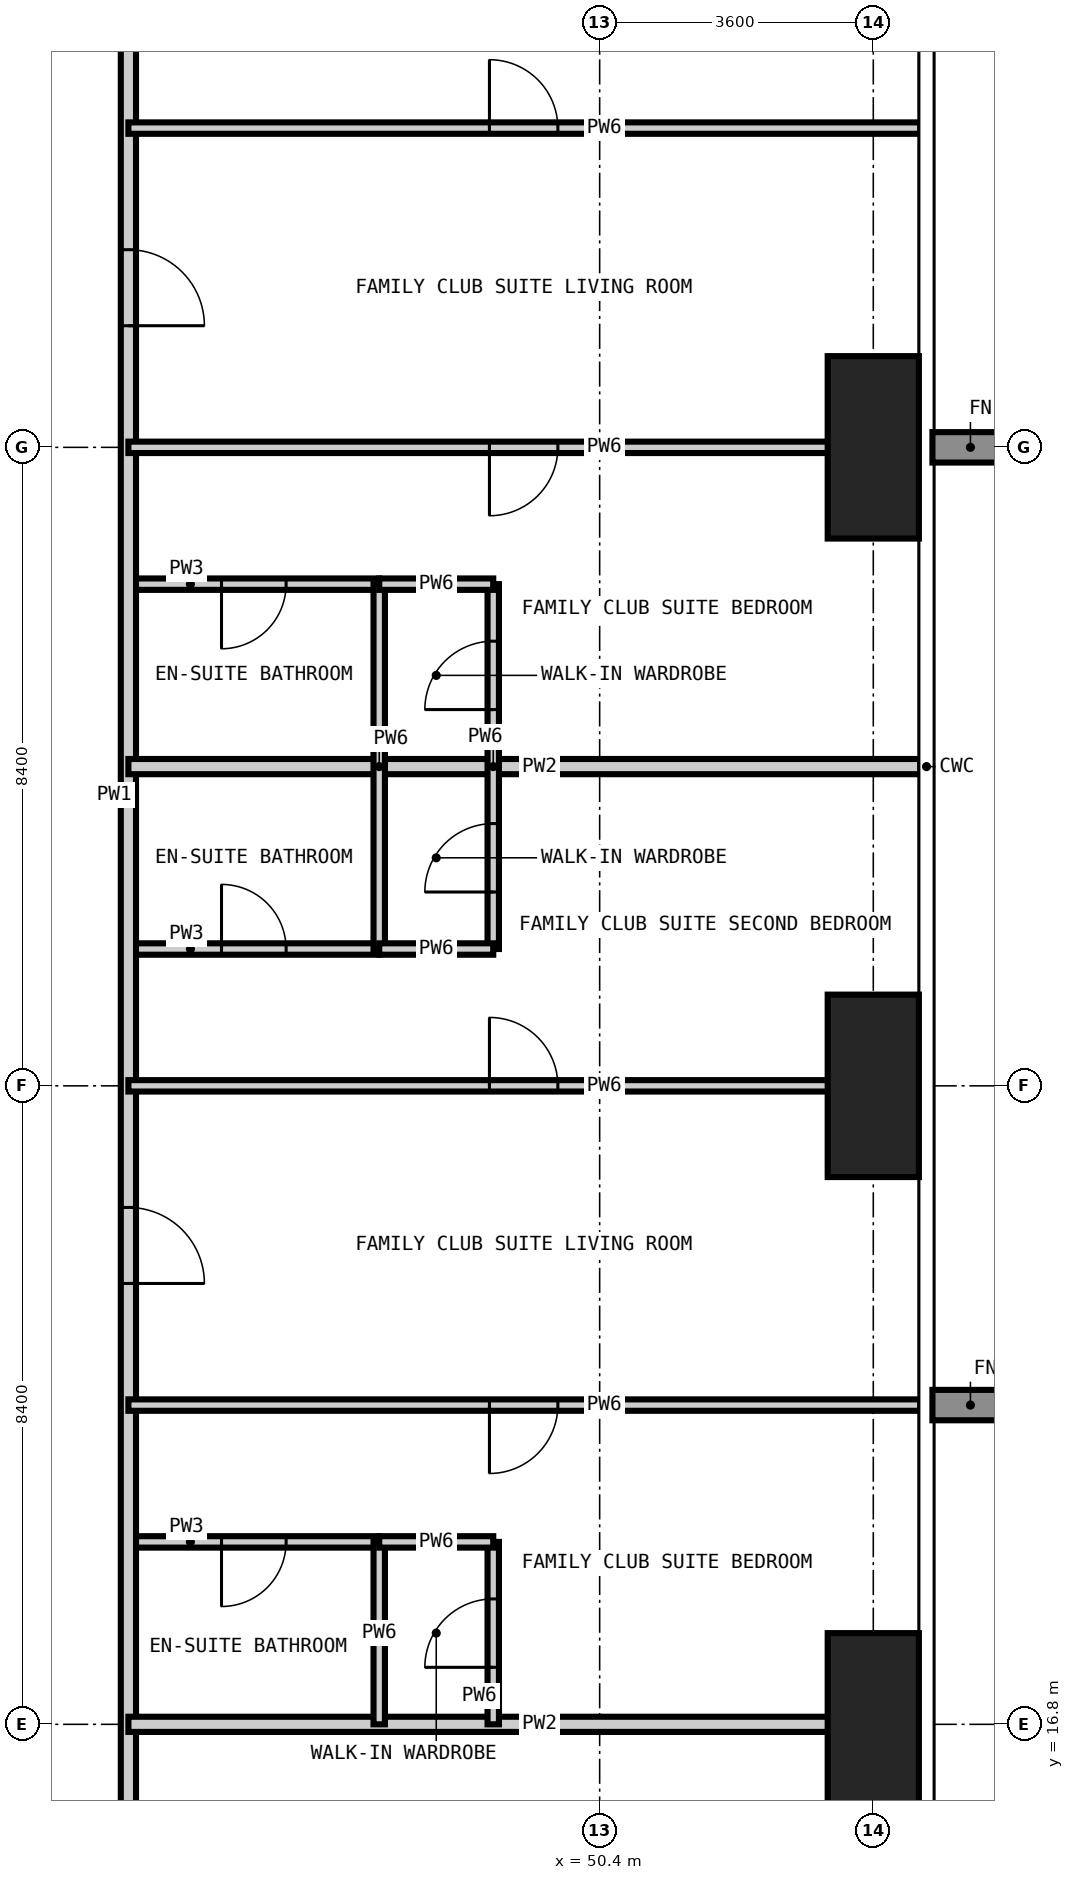
"""IFC4 building model, lengths in metres.
Left out: names, types, materials, properties, quantities, classifications, styles, units other than length and angle.
Written with IfcOpenShell. Run it as: python <this file> out.ifc"""

import sys

from ifc_helpers import new_model, si_unit, direction, frame, frame_2d, origin, origin_2d, place, context, subcontext, project, spatial, rectangle, extrude, element, fill, save


model = new_model("IFC4")
c1 = context("Model", 3, precision=1e-05, world=origin(), true_north=direction((0.0, 1.0)))
c2 = subcontext(c1, "Body", "Model", "MODEL_VIEW")
j1 = project(units=[si_unit("LENGTHUNIT", "METRE"), si_unit("PLANEANGLEUNIT", "RADIAN")], contexts=[c1])
p1 = place(None, origin())
s1 = spatial("IfcSite", under=j1, at=p1, CompositionType="ELEMENT")
p2 = place(p1, origin())
s2 = spatial("IfcBuilding", under=s1, at=p2, CompositionType="ELEMENT")
p3 = place(p2, frame((0.0, 0.0, 198.6)))
s3 = spatial("IfcBuildingStorey", under=s2, at=p3, CompositionType="ELEMENT", Elevation=198.6)
for number, where, z_axis, x_axis in (
    (1, (54.0, 16.8, -0.35), (0.0, 0.0, 1.0), (1.0, 0.0, 0.0)),
    (2, (54.0, 25.2, -0.35), (0.0, 0.0, 1.0), (1.0, 0.0, 0.0)),
    (3, (54.0, 33.6, -0.35), (0.0, 0.0, 1.0), (1.0, 0.0, 0.0)),
):
    element("IfcColumn", number, at=place(p3, frame(where, z_axis=z_axis, x_axis=x_axis)), inside=s3, PredefinedType="COLUMN", context=c2, shape_type="SweptSolid", body=[
        extrude(rectangle(XDim=1.2, YDim=2.4, at=origin_2d()), origin(), (0.0, 0.0, 1.0), 3.6),
    ])
p4 = place(p3, frame((44.2, 19.2, 0.0), z_axis=(0.0, 0.0, 1.0), x_axis=(1.0, 0.0, 0.0)))
e4 = element("IfcWall", 4, at=p4, inside=s3, PredefinedType="PARTITIONING", context=c2, shape_type="SweptSolid", body=[
    extrude(rectangle(XDim=3.3, YDim=0.15, at=frame_2d((1.65, 0.0))), origin(), (0.0, 0.0, 1.0), 3.25),
])
p5 = place(p4, frame((1.225, 0.0, 0.0)))
e5 = element("IfcOpeningElement", 5, at=p5, cuts=e4, PredefinedType="OPENING", context=c2, shape_type="SweptSolid", body=[
    extrude(rectangle(XDim=0.85, YDim=2.1, at=frame_2d((0.425, 1.05))), frame((0.0, 0.085, 0.0), z_axis=(0.0, -1.0, 0.0), x_axis=(1.0, 0.0, 0.0)), (0.0, 0.0, 1.0), 0.17),
])
p6 = place(p3, frame((44.2, 27.0, 0.0), z_axis=(0.0, 0.0, 1.0), x_axis=(1.0, 0.0, 0.0)))
e6 = element("IfcWall", 6, at=p6, inside=s3, PredefinedType="PARTITIONING", context=c2, shape_type="SweptSolid", body=[
    extrude(rectangle(XDim=3.3, YDim=0.15, at=frame_2d((1.65, 0.0))), origin(), (0.0, 0.0, 1.0), 3.25),
])
p7 = place(p6, frame((1.225, 0.0, 0.0)))
e7 = element("IfcOpeningElement", 7, at=p7, cuts=e6, PredefinedType="OPENING", context=c2, shape_type="SweptSolid", body=[
    extrude(rectangle(XDim=0.85, YDim=2.1, at=frame_2d((0.425, 1.05))), frame((0.0, 0.085, 0.0), z_axis=(0.0, -1.0, 0.0), x_axis=(1.0, 0.0, 0.0)), (0.0, 0.0, 1.0), 0.17),
])
p8 = place(p3, frame((44.2, 31.8, 0.0), z_axis=(0.0, 0.0, 1.0), x_axis=(1.0, 0.0, 0.0)))
e8 = element("IfcWall", 8, at=p8, inside=s3, PredefinedType="PARTITIONING", context=c2, shape_type="SweptSolid", body=[
    extrude(rectangle(XDim=3.3, YDim=0.15, at=frame_2d((1.65, 0.0))), origin(), (0.0, 0.0, 1.0), 3.25),
])
p9 = place(p8, frame((1.225, 0.0, 0.0)))
e9 = element("IfcOpeningElement", 9, at=p9, cuts=e8, PredefinedType="OPENING", context=c2, shape_type="SweptSolid", body=[
    extrude(rectangle(XDim=0.85, YDim=2.1, at=frame_2d((0.425, 1.05))), frame((0.0, 0.085, 0.0), z_axis=(0.0, -1.0, 0.0), x_axis=(1.0, 0.0, 0.0)), (0.0, 0.0, 1.0), 0.17),
])
p10 = place(p3, frame((44.2, 44.8, 0.0), z_axis=(0.0, 0.0, 1.0), x_axis=(0.0, -1.0, 0.0)))
e10 = element("IfcWall", 10, at=p10, inside=s3, PredefinedType="PARTITIONING", context=c2, shape_type="SweptSolid", body=[
    extrude(rectangle(XDim=31.4, YDim=0.2, at=frame_2d((15.7, 0.0))), origin(), (0.0, 0.0, 1.0), 3.25),
])
p11 = place(p10, frame((21.2, 0.0, 0.0)))
e11 = element("IfcOpeningElement", 11, at=p11, cuts=e10, PredefinedType="OPENING", context=c2, shape_type="SweptSolid", body=[
    extrude(rectangle(XDim=1.0, YDim=2.2, at=frame_2d((0.5, 1.1))), frame((0.0, 0.11, 0.0), z_axis=(0.0, -1.0, 0.0), x_axis=(1.0, 0.0, 0.0)), (0.0, 0.0, 1.0), 0.22),
])
p12 = place(p10, frame((8.6, 0.0, 0.0)))
e12 = element("IfcOpeningElement", 12, at=p12, cuts=e10, PredefinedType="OPENING", context=c2, shape_type="SweptSolid", body=[
    extrude(rectangle(XDim=1.0, YDim=2.2, at=frame_2d((0.5, 1.1))), frame((0.0, 0.11, 0.0), z_axis=(0.0, -1.0, 0.0), x_axis=(1.0, 0.0, 0.0)), (0.0, 0.0, 1.0), 0.22),
])
p13 = place(p10, frame((29.2, 0.0, 0.0)))
e13 = element("IfcOpeningElement", 13, at=p13, cuts=e10, PredefinedType="OPENING", context=c2, shape_type="SweptSolid", body=[
    extrude(rectangle(XDim=1.0, YDim=2.2, at=frame_2d((0.5, 1.1))), frame((0.0, 0.11, 0.0), z_axis=(0.0, -1.0, 0.0), x_axis=(1.0, 0.0, 0.0)), (0.0, 0.0, 1.0), 0.22),
])
p14 = place(p10, frame((0.9, 0.0, 0.0)))
e14 = element("IfcOpeningElement", 14, at=p14, cuts=e10, PredefinedType="OPENING", context=c2, shape_type="SweptSolid", body=[
    extrude(rectangle(XDim=1.0, YDim=2.2, at=frame_2d((0.5, 1.1))), frame((0.0, 0.11, 0.0), z_axis=(0.0, -1.0, 0.0), x_axis=(1.0, 0.0, 0.0)), (0.0, 0.0, 1.0), 0.22),
])
for number, where, z_axis, x_axis in (
    (15, (44.2, 16.8, 0.0), (0.0, 0.0, 1.0), (1.0, 0.0, 0.0)),
    (16, (44.2, 29.4, 0.0), (0.0, 0.0, 1.0), (1.0, 0.0, 0.0)),
):
    element("IfcWall", number, at=place(p3, frame(where, z_axis=z_axis, x_axis=x_axis)), inside=s3, PredefinedType="PARTITIONING", context=c2, shape_type="SweptSolid", body=[
        extrude(rectangle(XDim=10.418, YDim=0.2, at=frame_2d((5.209, 0.0))), origin(), (0.0, 0.0, 1.0), 3.25),
    ])
p15 = place(p3, frame((47.5, 16.8, 0.0), z_axis=(0.0, 0.0, 1.0), x_axis=(0.0, 1.0, 0.0)))
e17 = element("IfcWall", 17, at=p15, inside=s3, PredefinedType="PARTITIONING", context=c2, shape_type="SweptSolid", body=[
    extrude(rectangle(XDim=2.4, YDim=0.15, at=frame_2d((1.2, 0.0))), origin(), (0.0, 0.0, 1.0), 3.25),
])
p16 = place(p3, frame((47.5, 27.0, 0.0), z_axis=(0.0, 0.0, 1.0), x_axis=(0.0, 1.0, 0.0)))
e18 = element("IfcWall", 18, at=p16, inside=s3, PredefinedType="PARTITIONING", context=c2, shape_type="SweptSolid", body=[
    extrude(rectangle(XDim=4.8, YDim=0.15, at=frame_2d((2.4, 0.0))), origin(), (0.0, 0.0, 1.0), 3.25),
])
p17 = place(p3, frame((49.0, 16.8, 0.0), z_axis=(0.0, 0.0, 1.0), x_axis=(0.0, 1.0, 0.0)))
e19 = element("IfcWall", 19, at=p17, inside=s3, PredefinedType="PARTITIONING", context=c2, shape_type="SweptSolid", body=[
    extrude(rectangle(XDim=2.4, YDim=0.15, at=frame_2d((1.2, 0.0))), origin(), (0.0, 0.0, 1.0), 3.25),
])
p18 = place(p17, frame((0.75, 0.0, 0.0)))
e20 = element("IfcOpeningElement", 20, at=p18, cuts=e19, PredefinedType="OPENING", context=c2, shape_type="SweptSolid", body=[
    extrude(rectangle(XDim=0.9, YDim=2.1, at=frame_2d((0.45, 1.05))), frame((0.0, 0.085, 0.0), z_axis=(0.0, -1.0, 0.0), x_axis=(1.0, 0.0, 0.0)), (0.0, 0.0, 1.0), 0.17),
])
p19 = place(p3, frame((49.0, 27.0, 0.0), z_axis=(0.0, 0.0, 1.0), x_axis=(0.0, 1.0, 0.0)))
e21 = element("IfcWall", 21, at=p19, inside=s3, PredefinedType="PARTITIONING", context=c2, shape_type="SweptSolid", body=[
    extrude(rectangle(XDim=4.8, YDim=0.15, at=frame_2d((2.4, 0.0))), origin(), (0.0, 0.0, 1.0), 3.25),
])
p20 = place(p19, frame((0.75, 0.0, 0.0)))
e22 = element("IfcOpeningElement", 22, at=p20, cuts=e21, PredefinedType="OPENING", context=c2, shape_type="SweptSolid", body=[
    extrude(rectangle(XDim=0.9, YDim=2.1, at=frame_2d((0.45, 1.05))), frame((0.0, 0.085, 0.0), z_axis=(0.0, -1.0, 0.0), x_axis=(1.0, 0.0, 0.0)), (0.0, 0.0, 1.0), 0.17),
])
p21 = place(p19, frame((3.15, 0.0, 0.0)))
e23 = element("IfcOpeningElement", 23, at=p21, cuts=e21, PredefinedType="OPENING", context=c2, shape_type="SweptSolid", body=[
    extrude(rectangle(XDim=0.9, YDim=2.1, at=frame_2d((0.45, 1.05))), frame((0.0, 0.085, 0.0), z_axis=(0.0, -1.0, 0.0), x_axis=(1.0, 0.0, 0.0)), (0.0, 0.0, 1.0), 0.17),
])
p22 = place(p3, frame((47.5, 19.2, 0.0), z_axis=(0.0, 0.0, 1.0), x_axis=(1.0, 0.0, 0.0)))
e24 = element("IfcWall", 24, at=p22, inside=s3, PredefinedType="PARTITIONING", context=c2, shape_type="SweptSolid", body=[
    extrude(rectangle(XDim=1.5, YDim=0.15, at=frame_2d((0.75, 0.0))), origin(), (0.0, 0.0, 1.0), 3.25),
])
p23 = place(p3, frame((44.2, 21.0, 0.0), z_axis=(0.0, 0.0, 1.0), x_axis=(1.0, 0.0, 0.0)))
e25 = element("IfcWall", 25, at=p23, inside=s3, PredefinedType="PARTITIONING", context=c2, shape_type="SweptSolid", body=[
    extrude(rectangle(XDim=10.418, YDim=0.15, at=frame_2d((5.209, 0.0))), origin(), (0.0, 0.0, 1.0), 3.25),
])
p24 = place(p23, frame((4.75, 0.0, 0.0)))
e26 = element("IfcOpeningElement", 26, at=p24, cuts=e25, PredefinedType="OPENING", context=c2, shape_type="SweptSolid", body=[
    extrude(rectangle(XDim=0.9, YDim=2.1, at=frame_2d((0.45, 1.05))), frame((0.0, 0.085, 0.0), z_axis=(0.0, -1.0, 0.0), x_axis=(1.0, 0.0, 0.0)), (0.0, 0.0, 1.0), 0.17),
])
p25 = place(p3, frame((44.2, 25.2, 0.0), z_axis=(0.0, 0.0, 1.0), x_axis=(1.0, 0.0, 0.0)))
e27 = element("IfcWall", 27, at=p25, inside=s3, PredefinedType="PARTITIONING", context=c2, shape_type="SweptSolid", body=[
    extrude(rectangle(XDim=10.418, YDim=0.15, at=frame_2d((5.209, 0.0))), origin(), (0.0, 0.0, 1.0), 3.25),
])
p26 = place(p25, frame((4.75, 0.0, 0.0)))
e28 = element("IfcOpeningElement", 28, at=p26, cuts=e27, PredefinedType="OPENING", context=c2, shape_type="SweptSolid", body=[
    extrude(rectangle(XDim=0.9, YDim=2.1, at=frame_2d((0.45, 1.05))), frame((0.0, 0.085, 0.0), z_axis=(0.0, -1.0, 0.0), x_axis=(1.0, 0.0, 0.0)), (0.0, 0.0, 1.0), 0.17),
])
for number, where, z_axis, x_axis in (
    (29, (47.5, 27.0, 0.0), (0.0, 0.0, 1.0), (1.0, 0.0, 0.0)),
    (30, (47.5, 31.8, 0.0), (0.0, 0.0, 1.0), (1.0, 0.0, 0.0)),
):
    element("IfcWall", number, at=place(p3, frame(where, z_axis=z_axis, x_axis=x_axis)), inside=s3, PredefinedType="PARTITIONING", context=c2, shape_type="SweptSolid", body=[
        extrude(rectangle(XDim=1.5, YDim=0.15, at=frame_2d((0.75, 0.0))), origin(), (0.0, 0.0, 1.0), 3.25),
    ])
p27 = place(p3, frame((44.2, 33.6, 0.0), z_axis=(0.0, 0.0, 1.0), x_axis=(1.0, 0.0, 0.0)))
e31 = element("IfcWall", 31, at=p27, inside=s3, PredefinedType="PARTITIONING", context=c2, shape_type="SweptSolid", body=[
    extrude(rectangle(XDim=10.418, YDim=0.15, at=frame_2d((5.209, 0.0))), origin(), (0.0, 0.0, 1.0), 3.25),
])
p28 = place(p27, frame((4.75, 0.0, 0.0)))
e32 = element("IfcOpeningElement", 32, at=p28, cuts=e31, PredefinedType="OPENING", context=c2, shape_type="SweptSolid", body=[
    extrude(rectangle(XDim=0.9, YDim=2.1, at=frame_2d((0.45, 1.05))), frame((0.0, 0.085, 0.0), z_axis=(0.0, -1.0, 0.0), x_axis=(1.0, 0.0, 0.0)), (0.0, 0.0, 1.0), 0.17),
])
p29 = place(p3, frame((44.2, 37.8, 0.0), z_axis=(0.0, 0.0, 1.0), x_axis=(1.0, 0.0, 0.0)))
e33 = element("IfcWall", 33, at=p29, inside=s3, PredefinedType="PARTITIONING", context=c2, shape_type="SweptSolid", body=[
    extrude(rectangle(XDim=10.418, YDim=0.15, at=frame_2d((5.209, 0.0))), origin(), (0.0, 0.0, 1.0), 3.25),
])
p30 = place(p29, frame((4.75, 0.0, 0.0)))
e34 = element("IfcOpeningElement", 34, at=p30, cuts=e33, PredefinedType="OPENING", context=c2, shape_type="SweptSolid", body=[
    extrude(rectangle(XDim=0.9, YDim=2.1, at=frame_2d((0.45, 1.05))), frame((0.0, 0.085, 0.0), z_axis=(0.0, -1.0, 0.0), x_axis=(1.0, 0.0, 0.0)), (0.0, 0.0, 1.0), 0.17),
])
p31 = place(p11, origin())
e35 = element("IfcDoor", 35, at=p31, inside=s3, OperationType="SINGLE_SWING_RIGHT", PredefinedType="DOOR", context=c2, shape_type="SweptSolid", body=[
    extrude(rectangle(XDim=1.0, YDim=2.2, at=frame_2d((0.5, 1.1))), frame((0.0, 0.025, 0.0), z_axis=(0.0, -1.0, 0.0), x_axis=(1.0, 0.0, 0.0)), (0.0, 0.0, 1.0), 0.05),
])
fill(e11, e35)
p32 = place(p24, frame((0.9, 0.0, 0.0), z_axis=(0.0, 0.0, 1.0), x_axis=(-1.0, 0.0, 0.0)))
e36 = element("IfcDoor", 36, at=p32, inside=s3, OperationType="SINGLE_SWING_RIGHT", PredefinedType="DOOR", context=c2, shape_type="SweptSolid", body=[
    extrude(rectangle(XDim=0.9, YDim=2.1, at=frame_2d((0.45, 1.05))), frame((0.0, 0.025, 0.0), z_axis=(0.0, -1.0, 0.0), x_axis=(1.0, 0.0, 0.0)), (0.0, 0.0, 1.0), 0.05),
])
fill(e26, e36)
p33 = place(p5, frame((0.85, 0.0, 0.0), z_axis=(0.0, 0.0, 1.0), x_axis=(-1.0, 0.0, 0.0)))
e37 = element("IfcDoor", 37, at=p33, inside=s3, OperationType="SINGLE_SWING_RIGHT", PredefinedType="DOOR", context=c2, shape_type="SweptSolid", body=[
    extrude(rectangle(XDim=0.85, YDim=2.1, at=frame_2d((0.425, 1.05))), frame((0.0, 0.025, 0.0), z_axis=(0.0, -1.0, 0.0), x_axis=(1.0, 0.0, 0.0)), (0.0, 0.0, 1.0), 0.05),
])
fill(e5, e37)
p34 = place(p18, origin())
e38 = element("IfcDoor", 38, at=p34, inside=s3, OperationType="SINGLE_SWING_LEFT", PredefinedType="DOOR", context=c2, shape_type="SweptSolid", body=[
    extrude(rectangle(XDim=0.9, YDim=2.1, at=frame_2d((0.45, 1.05))), frame((0.0, 0.025, 0.0), z_axis=(0.0, -1.0, 0.0), x_axis=(1.0, 0.0, 0.0)), (0.0, 0.0, 1.0), 0.05),
])
fill(e20, e38)
p35 = place(p26, origin())
e39 = element("IfcDoor", 39, at=p35, inside=s3, OperationType="SINGLE_SWING_LEFT", PredefinedType="DOOR", context=c2, shape_type="SweptSolid", body=[
    extrude(rectangle(XDim=0.9, YDim=2.1, at=frame_2d((0.45, 1.05))), frame((0.0, 0.025, 0.0), z_axis=(0.0, -1.0, 0.0), x_axis=(1.0, 0.0, 0.0)), (0.0, 0.0, 1.0), 0.05),
])
fill(e28, e39)
p36 = place(p7, origin())
e40 = element("IfcDoor", 40, at=p36, inside=s3, OperationType="SINGLE_SWING_LEFT", PredefinedType="DOOR", context=c2, shape_type="SweptSolid", body=[
    extrude(rectangle(XDim=0.85, YDim=2.1, at=frame_2d((0.425, 1.05))), frame((0.0, 0.025, 0.0), z_axis=(0.0, -1.0, 0.0), x_axis=(1.0, 0.0, 0.0)), (0.0, 0.0, 1.0), 0.05),
])
fill(e7, e40)
p37 = place(p20, origin())
e41 = element("IfcDoor", 41, at=p37, inside=s3, OperationType="SINGLE_SWING_LEFT", PredefinedType="DOOR", context=c2, shape_type="SweptSolid", body=[
    extrude(rectangle(XDim=0.9, YDim=2.1, at=frame_2d((0.45, 1.05))), frame((0.0, 0.025, 0.0), z_axis=(0.0, -1.0, 0.0), x_axis=(1.0, 0.0, 0.0)), (0.0, 0.0, 1.0), 0.05),
])
fill(e22, e41)
p38 = place(p12, origin())
e42 = element("IfcDoor", 42, at=p38, inside=s3, OperationType="SINGLE_SWING_RIGHT", PredefinedType="DOOR", context=c2, shape_type="SweptSolid", body=[
    extrude(rectangle(XDim=1.0, YDim=2.2, at=frame_2d((0.5, 1.1))), frame((0.0, 0.025, 0.0), z_axis=(0.0, -1.0, 0.0), x_axis=(1.0, 0.0, 0.0)), (0.0, 0.0, 1.0), 0.05),
])
fill(e12, e42)
p39 = place(p28, frame((0.9, 0.0, 0.0), z_axis=(0.0, 0.0, 1.0), x_axis=(-1.0, 0.0, 0.0)))
e43 = element("IfcDoor", 43, at=p39, inside=s3, OperationType="SINGLE_SWING_RIGHT", PredefinedType="DOOR", context=c2, shape_type="SweptSolid", body=[
    extrude(rectangle(XDim=0.9, YDim=2.1, at=frame_2d((0.45, 1.05))), frame((0.0, 0.025, 0.0), z_axis=(0.0, -1.0, 0.0), x_axis=(1.0, 0.0, 0.0)), (0.0, 0.0, 1.0), 0.05),
])
fill(e32, e43)
p40 = place(p9, frame((0.85, 0.0, 0.0), z_axis=(0.0, 0.0, 1.0), x_axis=(-1.0, 0.0, 0.0)))
e44 = element("IfcDoor", 44, at=p40, inside=s3, OperationType="SINGLE_SWING_RIGHT", PredefinedType="DOOR", context=c2, shape_type="SweptSolid", body=[
    extrude(rectangle(XDim=0.85, YDim=2.1, at=frame_2d((0.425, 1.05))), frame((0.0, 0.025, 0.0), z_axis=(0.0, -1.0, 0.0), x_axis=(1.0, 0.0, 0.0)), (0.0, 0.0, 1.0), 0.05),
])
fill(e9, e44)
p41 = place(p21, origin())
e45 = element("IfcDoor", 45, at=p41, inside=s3, OperationType="SINGLE_SWING_LEFT", PredefinedType="DOOR", context=c2, shape_type="SweptSolid", body=[
    extrude(rectangle(XDim=0.9, YDim=2.1, at=frame_2d((0.45, 1.05))), frame((0.0, 0.025, 0.0), z_axis=(0.0, -1.0, 0.0), x_axis=(1.0, 0.0, 0.0)), (0.0, 0.0, 1.0), 0.05),
])
fill(e23, e45)
p42 = place(p30, origin())
e46 = element("IfcDoor", 46, at=p42, inside=s3, OperationType="SINGLE_SWING_LEFT", PredefinedType="DOOR", context=c2, shape_type="SweptSolid", body=[
    extrude(rectangle(XDim=0.9, YDim=2.1, at=frame_2d((0.45, 1.05))), frame((0.0, 0.025, 0.0), z_axis=(0.0, -1.0, 0.0), x_axis=(1.0, 0.0, 0.0)), (0.0, 0.0, 1.0), 0.05),
])
fill(e34, e46)
save(model, sys.argv[1])
